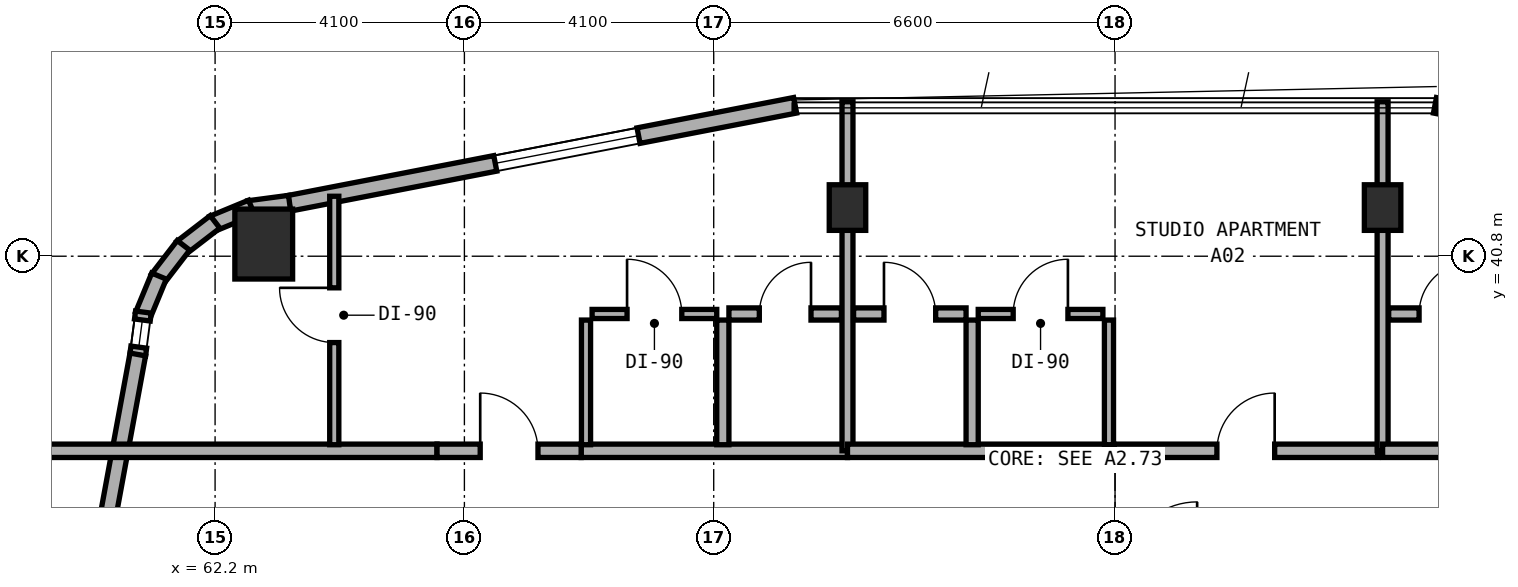
"""IFC4 building model, lengths in metres.
Left out: names, types, materials, properties, quantities, classifications, styles, units other than length and angle.
Written with IfcOpenShell. Run it as: python <this file> out.ifc"""

import sys

from ifc_helpers import new_model, si_unit, direction, frame, frame_2d, origin, origin_2d, place, context, subcontext, project, spatial, rectangle, extrude, element, fill, save


model = new_model("IFC4")
c1 = context("Model", 3, precision=1e-05, world=origin(), true_north=direction((0.0, 1.0)))
c2 = subcontext(c1, "Body", "Model", "MODEL_VIEW")
j1 = project(units=[si_unit("LENGTHUNIT", "METRE"), si_unit("PLANEANGLEUNIT", "RADIAN")], contexts=[c1])
p1 = place(None, origin())
s1 = spatial("IfcSite", under=j1, at=p1, CompositionType="ELEMENT")
p2 = place(p1, origin())
s2 = spatial("IfcBuilding", under=s1, at=p2, CompositionType="ELEMENT")
p3 = place(p2, frame((0.0, 0.0, 98.5)))
s3 = spatial("IfcBuildingStorey", under=s2, at=p3, CompositionType="ELEMENT", Elevation=98.5)
for number, where, z_axis, x_axis in (
    (1, (72.6, 41.6, 0.0), (0.0, 0.0, 1.0), (1.0, 0.0, 0.0)),
    (2, (81.4, 41.6, 0.0), (0.0, 0.0, 1.0), (1.0, 0.0, 0.0)),
):
    element("IfcColumn", number, at=place(p3, frame(where, z_axis=z_axis, x_axis=x_axis)), inside=s3, PredefinedType="COLUMN", context=c2, shape_type="SweptSolid", body=[
        extrude(rectangle(XDim=0.6, YDim=0.75, at=origin_2d()), origin(), (0.0, 0.0, 1.0), 3.5),
    ])
p4 = place(p3, frame((63.0, 41.0, 0.0), z_axis=(0.0, 0.0, 1.0), x_axis=(1.0, 0.0, 0.0)))
e3 = element("IfcColumn", 3, at=p4, inside=s3, PredefinedType="COLUMN", context=c2, shape_type="SweptSolid", body=[
    extrude(rectangle(XDim=0.95, YDim=1.15, at=origin_2d()), origin(), (0.0, 0.0, 1.0), 3.5),
])
p5 = place(p3, frame((90.583, 41.67, 0.0), z_axis=(0.0, 0.0, 1.0), x_axis=(-0.981750199588, 0.190175039396, 0.0)))
e4 = element("IfcWall", 4, at=p5, inside=s3, PredefinedType="STANDARD", context=c2, shape_type="SweptSolid", body=[
    extrude(rectangle(XDim=8.477, YDim=0.26, at=frame_2d((4.238, 0.0))), origin(), (0.0, 0.0, 1.0), 3.25),
])
p6 = place(p5, frame((3.454, 0.0, 0.8)))
e5 = element("IfcOpeningElement", 5, at=p6, cuts=e4, PredefinedType="OPENING", context=c2, shape_type="SweptSolid", body=[
    extrude(rectangle(XDim=2.4, YDim=1.6, at=frame_2d((1.2, 0.8))), frame((0.0, 0.14, 0.0), z_axis=(0.0, -1.0, 0.0), x_axis=(1.0, 0.0, 0.0)), (0.0, 0.0, 1.0), 0.28),
])
p7 = place(p3, frame((71.739, 43.282, 0.0), z_axis=(0.0, 0.0, 1.0), x_axis=(-0.981750199588, -0.190175039396, 0.0)))
e6 = element("IfcWall", 6, at=p7, inside=s3, PredefinedType="STANDARD", context=c2, shape_type="SweptSolid", body=[
    extrude(rectangle(XDim=8.477, YDim=0.26, at=frame_2d((4.238, 0.0))), origin(), (0.0, 0.0, 1.0), 3.25),
])
p8 = place(p7, frame((2.623, 0.0, 0.8)))
e7 = element("IfcOpeningElement", 7, at=p8, cuts=e6, PredefinedType="OPENING", context=c2, shape_type="SweptSolid", body=[
    extrude(rectangle(XDim=2.4, YDim=1.6, at=frame_2d((1.2, 0.8))), frame((0.0, 0.14, 0.0), z_axis=(0.0, -1.0, 0.0), x_axis=(1.0, 0.0, 0.0)), (0.0, 0.0, 1.0), 0.28),
])
p9 = place(p3, frame((63.425, 41.672, 0.0), z_axis=(0.0, 0.0, 1.0), x_axis=(-0.991300187529, -0.13162043232, 0.0)))
e8 = element("IfcWall", 8, at=p9, inside=s3, PredefinedType="STANDARD", context=c2, shape_type="SweptSolid", body=[
    extrude(rectangle(XDim=0.677, YDim=0.26, at=frame_2d((0.338, 0.0))), origin(), (0.0, 0.0, 1.0), 3.25),
])
for number, where, z_axis, x_axis in (
    (9, (62.8, 41.601, 0.0), (0.0, 0.0, 1.0), (-0.924, -0.382, 0.0)),
    (10, (62.199, 41.364, 0.0), (0.0, 0.0, 1.0), (-0.793, -0.61, 0.0)),
    (11, (61.68, 40.979, 0.0), (0.0, 0.0, 1.0), (-0.609, -0.793, 0.0)),
):
    element("IfcWall", number, at=place(p3, frame(where, z_axis=z_axis, x_axis=x_axis)), inside=s3, PredefinedType="STANDARD", context=c2, shape_type="SweptSolid", body=[
        extrude(rectangle(XDim=0.694, YDim=0.26, at=frame_2d((0.347, 0.0))), origin(), (0.0, 0.0, 1.0), 3.25),
    ])
p10 = place(p3, frame((61.278, 40.473, 0.0), z_axis=(0.0, 0.0, 1.0), x_axis=(-0.382289608286, -0.924042561464, 0.0)))
e12 = element("IfcWall", 12, at=p10, inside=s3, PredefinedType="STANDARD", context=c2, shape_type="SweptSolid", body=[
    extrude(rectangle(XDim=0.694, YDim=0.26, at=frame_2d((0.347, 0.0))), origin(), (0.0, 0.0, 1.0), 3.25),
])
p11 = place(p3, frame((61.021, 39.881, 0.0), z_axis=(0.0, 0.0, 1.0), x_axis=(-0.130614135366, -0.991433279471, 0.0)))
e13 = element("IfcWall", 13, at=p11, inside=s3, PredefinedType="STANDARD", context=c2, shape_type="SweptSolid", body=[
    extrude(rectangle(XDim=0.712, YDim=0.26, at=frame_2d((0.356, 0.0))), origin(), (0.0, 0.0, 1.0), 3.25),
])
p12 = place(p11, frame((0.131, 0.0, 0.85)))
e14 = element("IfcOpeningElement", 14, at=p12, cuts=e13, PredefinedType="OPENING", context=c2, shape_type="SweptSolid", body=[
    extrude(rectangle(XDim=0.45, YDim=1.5, at=frame_2d((0.225, 0.75))), frame((0.0, 0.14, 0.0), z_axis=(0.0, -1.0, 0.0), x_axis=(1.0, 0.0, 0.0)), (0.0, 0.0, 1.0), 0.28),
])
p13 = place(p3, frame((60.929, 39.184, 0.0), z_axis=(0.0, 0.0, 1.0), x_axis=(-0.181209963057, -0.983444431215, 0.0)))
e15 = element("IfcWall", 15, at=p13, inside=s3, PredefinedType="STANDARD", context=c2, shape_type="SweptSolid", body=[
    extrude(rectangle(XDim=8.889, YDim=0.26, at=frame_2d((4.445, 0.0))), origin(), (0.0, 0.0, 1.0), 3.25),
])
p14 = place(p13, frame((5.045, 0.0, 0.8)))
e16 = element("IfcOpeningElement", 16, at=p14, cuts=e15, PredefinedType="OPENING", context=c2, shape_type="SweptSolid", body=[
    extrude(rectangle(XDim=2.4, YDim=1.6, at=frame_2d((1.2, 0.8))), frame((0.0, 0.14, 0.0), z_axis=(0.0, -1.0, 0.0), x_axis=(1.0, 0.0, 0.0)), (0.0, 0.0, 1.0), 0.28),
])
p15 = place(p3, frame((59.36, 37.6, 0.0), z_axis=(0.0, 0.0, 1.0), x_axis=(1.0, 0.0, 0.0)))
e17 = element("IfcWall", 17, at=p15, inside=s3, PredefinedType="SOLIDWALL", context=c2, shape_type="SweptSolid", body=[
    extrude(rectangle(XDim=6.49, YDim=0.22, at=frame_2d((3.245, 0.0))), origin(), (0.0, 0.0, 1.0), 2.945),
])
p16 = place(p3, frame((68.22, 37.6, 0.0), z_axis=(0.0, 0.0, 1.0), x_axis=(1.0, 0.0, 0.0)))
e18 = element("IfcWall", 18, at=p16, inside=s3, PredefinedType="SOLIDWALL", context=c2, shape_type="SweptSolid", body=[
    extrude(rectangle(XDim=4.38, YDim=0.22, at=frame_2d((2.19, 0.0))), origin(), (0.0, 0.0, 1.0), 2.825),
])
p17 = place(p3, frame((65.85, 37.6, 0.0), z_axis=(0.0, 0.0, 1.0), x_axis=(1.0, 0.0, 0.0)))
e19 = element("IfcWall", 19, at=p17, inside=s3, PredefinedType="SOLIDWALL", context=c2, shape_type="SweptSolid", body=[
    extrude(rectangle(XDim=2.37, YDim=0.22, at=frame_2d((1.185, 0.0))), origin(), (0.0, 0.0, 1.0), 3.22),
])
p18 = place(p17, frame((0.71, 0.0, 0.0)))
e20 = element("IfcOpeningElement", 20, at=p18, cuts=e19, PredefinedType="OPENING", context=c2, shape_type="SweptSolid", body=[
    extrude(rectangle(XDim=0.95, YDim=2.1, at=frame_2d((0.475, 1.05))), frame((0.0, 0.12, 0.0), z_axis=(0.0, -1.0, 0.0), x_axis=(1.0, 0.0, 0.0)), (0.0, 0.0, 1.0), 0.24),
])
p19 = place(p3, frame((64.16, 37.7, 0.0), z_axis=(0.0, 0.0, 1.0), x_axis=(0.0, 1.0, 0.0)))
e21 = element("IfcWall", 21, at=p19, inside=s3, PredefinedType="PARTITIONING", context=c2, shape_type="SweptSolid", body=[
    extrude(rectangle(XDim=4.086, YDim=0.15, at=frame_2d((2.043, 0.0))), origin(), (0.0, 0.0, 1.0), 2.945),
])
p20 = place(p19, frame((1.68, 0.0, 0.0)))
e22 = element("IfcOpeningElement", 22, at=p20, cuts=e21, PredefinedType="OPENING", context=c2, shape_type="SweptSolid", body=[
    extrude(rectangle(XDim=0.9, YDim=2.1, at=frame_2d((0.45, 1.05))), frame((0.0, 0.085, 0.0), z_axis=(0.0, -1.0, 0.0), x_axis=(1.0, 0.0, 0.0)), (0.0, 0.0, 1.0), 0.17),
])
p21 = place(p3, frame((70.55, 37.7, 0.0), z_axis=(0.0, 0.0, 1.0), x_axis=(0.0, 1.0, 0.0)))
e23 = element("IfcWall", 23, at=p21, inside=s3, PredefinedType="PLUMBINGWALL", context=c2, shape_type="SweptSolid", body=[
    extrude(rectangle(XDim=2.05, YDim=0.2, at=frame_2d((1.025, 0.0))), origin(), (0.0, 0.0, 1.0), 3.22),
])
p22 = place(p3, frame((68.3, 37.7, 0.0), z_axis=(0.0, 0.0, 1.0), x_axis=(0.0, 1.0, 0.0)))
e24 = element("IfcWall", 24, at=p22, inside=s3, PredefinedType="PARTITIONING", context=c2, shape_type="SweptSolid", body=[
    extrude(rectangle(XDim=2.05, YDim=0.15, at=frame_2d((1.025, 0.0))), origin(), (0.0, 0.0, 1.0), 3.22),
])
p23 = place(p3, frame((70.65, 39.85, 0.0), z_axis=(0.0, 0.0, 1.0), x_axis=(1.0, 0.0, 0.0)))
e25 = element("IfcWall", 25, at=p23, inside=s3, PredefinedType="PLUMBINGWALL", context=c2, shape_type="SweptSolid", body=[
    extrude(rectangle(XDim=1.85, YDim=0.2, at=frame_2d((0.925, 0.0))), origin(), (0.0, 0.0, 1.0), 3.22),
])
p24 = place(p23, frame((0.5, 0.0, 0.0)))
e26 = element("IfcOpeningElement", 26, at=p24, cuts=e25, PredefinedType="OPENING", context=c2, shape_type="SweptSolid", body=[
    extrude(rectangle(XDim=0.85, YDim=2.1, at=frame_2d((0.425, 1.05))), frame((0.0, 0.11, 0.0), z_axis=(0.0, -1.0, 0.0), x_axis=(1.0, 0.0, 0.0)), (0.0, 0.0, 1.0), 0.22),
])
p25 = place(p3, frame((68.4, 39.85, 0.0), z_axis=(0.0, 0.0, 1.0), x_axis=(1.0, 0.0, 0.0)))
e27 = element("IfcWall", 27, at=p25, inside=s3, PredefinedType="PARTITIONING", context=c2, shape_type="SweptSolid", body=[
    extrude(rectangle(XDim=2.05, YDim=0.15, at=frame_2d((1.025, 0.0))), origin(), (0.0, 0.0, 1.0), 3.22),
])
p26 = place(p25, frame((0.575, 0.0, 0.0)))
e28 = element("IfcOpeningElement", 28, at=p26, cuts=e27, PredefinedType="OPENING", context=c2, shape_type="SweptSolid", body=[
    extrude(rectangle(XDim=0.9, YDim=2.1, at=frame_2d((0.45, 1.05))), frame((0.0, 0.085, 0.0), z_axis=(0.0, -1.0, 0.0), x_axis=(1.0, 0.0, 0.0)), (0.0, 0.0, 1.0), 0.17),
])
p27 = place(p3, frame((72.6, 37.6, 0.0), z_axis=(0.0, 0.0, 1.0), x_axis=(0.0, 1.0, 0.0)))
e29 = element("IfcWall", 29, at=p27, inside=s3, PredefinedType="SOLIDWALL", context=c2, shape_type="SweptSolid", body=[
    extrude(rectangle(XDim=5.74, YDim=0.18, at=frame_2d((2.87, 0.0))), origin(), (0.0, 0.0, 1.0), 2.825),
])
p28 = place(p3, frame((72.6, 37.6, 0.0), z_axis=(0.0, 0.0, 1.0), x_axis=(1.0, 0.0, 0.0)))
e30 = element("IfcWall", 30, at=p28, inside=s3, PredefinedType="SOLIDWALL", context=c2, shape_type="SweptSolid", body=[
    extrude(rectangle(XDim=4.38, YDim=0.22, at=frame_2d((2.19, 0.0))), origin(), (0.0, 0.0, 1.0), 2.825),
])
p29 = place(p3, frame((76.98, 37.6, 0.0), z_axis=(0.0, 0.0, 1.0), x_axis=(1.0, 0.0, 0.0)))
e31 = element("IfcWall", 31, at=p29, inside=s3, PredefinedType="SOLIDWALL", context=c2, shape_type="SweptSolid", body=[
    extrude(rectangle(XDim=4.34, YDim=0.22, at=frame_2d((2.17, 0.0))), origin(), (0.0, 0.0, 1.0), 2.825),
])
p30 = place(p29, frame((1.695, 0.0, 0.0)))
e32 = element("IfcOpeningElement", 32, at=p30, cuts=e31, PredefinedType="OPENING", context=c2, shape_type="SweptSolid", body=[
    extrude(rectangle(XDim=0.95, YDim=2.1, at=frame_2d((0.475, 1.05))), frame((0.0, 0.12, 0.0), z_axis=(0.0, -1.0, 0.0), x_axis=(1.0, 0.0, 0.0)), (0.0, 0.0, 1.0), 0.24),
])
p31 = place(p3, frame((74.65, 37.7, 0.0), z_axis=(0.0, 0.0, 1.0), x_axis=(0.0, 1.0, 0.0)))
e33 = element("IfcWall", 33, at=p31, inside=s3, PredefinedType="PLUMBINGWALL", context=c2, shape_type="SweptSolid", body=[
    extrude(rectangle(XDim=2.05, YDim=0.2, at=frame_2d((1.025, 0.0))), origin(), (0.0, 0.0, 1.0), 2.985),
])
p32 = place(p3, frame((76.9, 37.7, 0.0), z_axis=(0.0, 0.0, 1.0), x_axis=(0.0, 1.0, 0.0)))
e34 = element("IfcWall", 34, at=p32, inside=s3, PredefinedType="PARTITIONING", context=c2, shape_type="SweptSolid", body=[
    extrude(rectangle(XDim=2.05, YDim=0.15, at=frame_2d((1.025, 0.0))), origin(), (0.0, 0.0, 1.0), 2.985),
])
p33 = place(p3, frame((72.7, 39.85, 0.0), z_axis=(0.0, 0.0, 1.0), x_axis=(1.0, 0.0, 0.0)))
e35 = element("IfcWall", 35, at=p33, inside=s3, PredefinedType="PLUMBINGWALL", context=c2, shape_type="SweptSolid", body=[
    extrude(rectangle(XDim=1.85, YDim=0.2, at=frame_2d((0.925, 0.0))), origin(), (0.0, 0.0, 1.0), 3.22),
])
p34 = place(p33, frame((0.5, 0.0, 0.0)))
e36 = element("IfcOpeningElement", 36, at=p34, cuts=e35, PredefinedType="OPENING", context=c2, shape_type="SweptSolid", body=[
    extrude(rectangle(XDim=0.85, YDim=2.1, at=frame_2d((0.425, 1.05))), frame((0.0, 0.11, 0.0), z_axis=(0.0, -1.0, 0.0), x_axis=(1.0, 0.0, 0.0)), (0.0, 0.0, 1.0), 0.22),
])
p35 = place(p3, frame((74.75, 39.85, 0.0), z_axis=(0.0, 0.0, 1.0), x_axis=(1.0, 0.0, 0.0)))
e37 = element("IfcWall", 37, at=p35, inside=s3, PredefinedType="PARTITIONING", context=c2, shape_type="SweptSolid", body=[
    extrude(rectangle(XDim=2.05, YDim=0.15, at=frame_2d((1.025, 0.0))), origin(), (0.0, 0.0, 1.0), 3.22),
])
p36 = place(p35, frame((0.575, 0.0, 0.0)))
e38 = element("IfcOpeningElement", 38, at=p36, cuts=e37, PredefinedType="OPENING", context=c2, shape_type="SweptSolid", body=[
    extrude(rectangle(XDim=0.9, YDim=2.1, at=frame_2d((0.45, 1.05))), frame((0.0, 0.085, 0.0), z_axis=(0.0, -1.0, 0.0), x_axis=(1.0, 0.0, 0.0)), (0.0, 0.0, 1.0), 0.17),
])
p37 = place(p3, frame((81.4, 37.6, 0.0), z_axis=(0.0, 0.0, 1.0), x_axis=(0.0, 1.0, 0.0)))
e39 = element("IfcWall", 39, at=p37, inside=s3, PredefinedType="SOLIDWALL", context=c2, shape_type="SweptSolid", body=[
    extrude(rectangle(XDim=5.74, YDim=0.18, at=frame_2d((2.87, 0.0))), origin(), (0.0, 0.0, 1.0), 2.825),
])
p38 = place(p3, frame((81.4, 37.6, 0.0), z_axis=(0.0, 0.0, 1.0), x_axis=(1.0, 0.0, 0.0)))
e40 = element("IfcWall", 40, at=p38, inside=s3, PredefinedType="SOLIDWALL", context=c2, shape_type="SweptSolid", body=[
    extrude(rectangle(XDim=4.38, YDim=0.22, at=frame_2d((2.19, 0.0))), origin(), (0.0, 0.0, 1.0), 2.825),
])
p39 = place(p3, frame((81.5, 39.85, 0.0), z_axis=(0.0, 0.0, 1.0), x_axis=(1.0, 0.0, 0.0)))
e41 = element("IfcWall", 41, at=p39, inside=s3, PredefinedType="PLUMBINGWALL", context=c2, shape_type="SweptSolid", body=[
    extrude(rectangle(XDim=1.85, YDim=0.2, at=frame_2d((0.925, 0.0))), origin(), (0.0, 0.0, 1.0), 2.825),
])
p40 = place(p39, frame((0.5, 0.0, 0.0)))
e42 = element("IfcOpeningElement", 42, at=p40, cuts=e41, PredefinedType="OPENING", context=c2, shape_type="SweptSolid", body=[
    extrude(rectangle(XDim=0.85, YDim=2.1, at=frame_2d((0.425, 1.05))), frame((0.0, 0.11, 0.0), z_axis=(0.0, -1.0, 0.0), x_axis=(1.0, 0.0, 0.0)), (0.0, 0.0, 1.0), 0.22),
])
p41 = place(p8, origin())
e43 = element("IfcWindow", 43, at=p41, inside=s3, PartitioningType="SINGLE_PANEL", PredefinedType="WINDOW", context=c2, shape_type="SweptSolid", body=[
    extrude(rectangle(XDim=2.4, YDim=1.6, at=frame_2d((1.2, 0.8))), frame((0.0, 0.03, 0.0), z_axis=(0.0, -1.0, 0.0), x_axis=(1.0, 0.0, 0.0)), (0.0, 0.0, 1.0), 0.06),
])
fill(e7, e43)
p42 = place(p12, origin())
e44 = element("IfcWindow", 44, at=p42, inside=s3, PartitioningType="SINGLE_PANEL", PredefinedType="WINDOW", context=c2, shape_type="SweptSolid", body=[
    extrude(rectangle(XDim=0.45, YDim=1.5, at=frame_2d((0.225, 0.75))), frame((0.0, 0.03, 0.0), z_axis=(0.0, -1.0, 0.0), x_axis=(1.0, 0.0, 0.0)), (0.0, 0.0, 1.0), 0.06),
])
fill(e14, e44)
p43 = place(p18, origin())
e45 = element("IfcDoor", 45, at=p43, inside=s3, OperationType="SINGLE_SWING_LEFT", PredefinedType="DOOR", context=c2, shape_type="SweptSolid", body=[
    extrude(rectangle(XDim=0.95, YDim=2.1, at=frame_2d((0.475, 1.05))), frame((0.0, 0.025, 0.0), z_axis=(0.0, -1.0, 0.0), x_axis=(1.0, 0.0, 0.0)), (0.0, 0.0, 1.0), 0.05),
])
fill(e20, e45)
p44 = place(p20, origin())
e46 = element("IfcDoor", 46, at=p44, inside=s3, OperationType="SINGLE_SWING_RIGHT", PredefinedType="DOOR", context=c2, shape_type="SweptSolid", body=[
    extrude(rectangle(XDim=0.9, YDim=2.1, at=frame_2d((0.45, 1.05))), frame((0.0, 0.025, 0.0), z_axis=(0.0, -1.0, 0.0), x_axis=(1.0, 0.0, 0.0)), (0.0, 0.0, 1.0), 0.05),
])
fill(e22, e46)
p45 = place(p24, origin())
e47 = element("IfcDoor", 47, at=p45, inside=s3, OperationType="SINGLE_SWING_RIGHT", PredefinedType="DOOR", context=c2, shape_type="SweptSolid", body=[
    extrude(rectangle(XDim=0.85, YDim=2.1, at=frame_2d((0.425, 1.05))), frame((0.0, 0.025, 0.0), z_axis=(0.0, -1.0, 0.0), x_axis=(1.0, 0.0, 0.0)), (0.0, 0.0, 1.0), 0.05),
])
fill(e26, e47)
p46 = place(p26, origin())
e48 = element("IfcDoor", 48, at=p46, inside=s3, OperationType="SINGLE_SWING_LEFT", PredefinedType="DOOR", context=c2, shape_type="SweptSolid", body=[
    extrude(rectangle(XDim=0.9, YDim=2.1, at=frame_2d((0.45, 1.05))), frame((0.0, 0.025, 0.0), z_axis=(0.0, -1.0, 0.0), x_axis=(1.0, 0.0, 0.0)), (0.0, 0.0, 1.0), 0.05),
])
fill(e28, e48)
p47 = place(p30, origin())
e49 = element("IfcDoor", 49, at=p47, inside=s3, OperationType="SINGLE_SWING_RIGHT", PredefinedType="DOOR", context=c2, shape_type="SweptSolid", body=[
    extrude(rectangle(XDim=0.95, YDim=2.1, at=frame_2d((0.475, 1.05))), frame((0.0, 0.025, 0.0), z_axis=(0.0, -1.0, 0.0), x_axis=(1.0, 0.0, 0.0)), (0.0, 0.0, 1.0), 0.05),
])
fill(e32, e49)
p48 = place(p34, origin())
e50 = element("IfcDoor", 50, at=p48, inside=s3, OperationType="SINGLE_SWING_LEFT", PredefinedType="DOOR", context=c2, shape_type="SweptSolid", body=[
    extrude(rectangle(XDim=0.85, YDim=2.1, at=frame_2d((0.425, 1.05))), frame((0.0, 0.025, 0.0), z_axis=(0.0, -1.0, 0.0), x_axis=(1.0, 0.0, 0.0)), (0.0, 0.0, 1.0), 0.05),
])
fill(e36, e50)
p49 = place(p36, origin())
e51 = element("IfcDoor", 51, at=p49, inside=s3, OperationType="SINGLE_SWING_RIGHT", PredefinedType="DOOR", context=c2, shape_type="SweptSolid", body=[
    extrude(rectangle(XDim=0.9, YDim=2.1, at=frame_2d((0.45, 1.05))), frame((0.0, 0.025, 0.0), z_axis=(0.0, -1.0, 0.0), x_axis=(1.0, 0.0, 0.0)), (0.0, 0.0, 1.0), 0.05),
])
fill(e38, e51)
p50 = place(p40, origin())
e52 = element("IfcDoor", 52, at=p50, inside=s3, OperationType="SINGLE_SWING_RIGHT", PredefinedType="DOOR", context=c2, shape_type="SweptSolid", body=[
    extrude(rectangle(XDim=0.85, YDim=2.1, at=frame_2d((0.425, 1.05))), frame((0.0, 0.025, 0.0), z_axis=(0.0, -1.0, 0.0), x_axis=(1.0, 0.0, 0.0)), (0.0, 0.0, 1.0), 0.05),
])
fill(e42, e52)
save(model, sys.argv[1])
